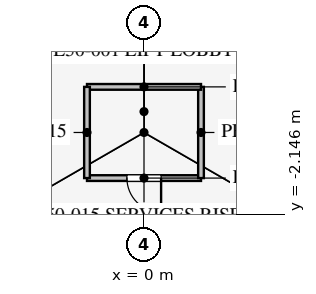
"""IFC4 building model, lengths in metres.
Left out: names, types, materials, properties, quantities, classifications, styles, units other than length and angle.
Written with IfcOpenShell. Run it as: python <this file> out.ifc"""

import sys

from ifc_helpers import new_model, si_unit, direction, frame, frame_2d, origin, place, context, subcontext, project, spatial, rectangle, extrude, element, fill, save


model = new_model("IFC4")
c1 = context("Model", 3, precision=1e-05, world=origin(), true_north=direction((0.0, 1.0)))
c2 = subcontext(c1, "Body", "Model", "MODEL_VIEW")
j1 = project(units=[si_unit("LENGTHUNIT", "METRE"), si_unit("PLANEANGLEUNIT", "RADIAN")], contexts=[c1])
p1 = place(None, origin())
s1 = spatial("IfcSite", under=j1, at=p1, CompositionType="ELEMENT")
p2 = place(p1, origin())
s2 = spatial("IfcBuilding", under=s1, at=p2, CompositionType="ELEMENT")
p3 = place(p2, frame((0.0, 0.0, 219.1)))
s3 = spatial("IfcBuildingStorey", under=s2, at=p3, CompositionType="ELEMENT", Elevation=219.1)
p4 = place(p3, frame((-1.5, -1.2, 0.0), z_axis=(0.0, 0.0, 1.0), x_axis=(1.0, 0.0, 0.0)))
e1 = element("IfcWall", 1, at=p4, inside=s3, PredefinedType="PARTITIONING", context=c2, shape_type="SweptSolid", body=[
    extrude(rectangle(XDim=3.0, YDim=0.15, at=frame_2d((1.5, 0.0))), origin(), (0.0, 0.0, 1.0), 4.0),
])
p5 = place(p4, frame((1.05, 0.0, 0.0)))
e2 = element("IfcOpeningElement", 2, at=p5, cuts=e1, PredefinedType="OPENING", context=c2, shape_type="SweptSolid", body=[
    extrude(rectangle(XDim=0.9, YDim=2.1, at=frame_2d((0.45, 1.05))), frame((0.0, 0.085, 0.0), z_axis=(0.0, -1.0, 0.0), x_axis=(1.0, 0.0, 0.0)), (0.0, 0.0, 1.0), 0.17),
])
p6 = place(p3, frame((1.5, -1.2, 0.0), z_axis=(0.0, 0.0, 1.0), x_axis=(0.0, 1.0, 0.0)))
e3 = element("IfcWall", 3, at=p6, inside=s3, PredefinedType="PARTITIONING", context=c2, shape_type="SweptSolid", body=[
    extrude(rectangle(XDim=2.4, YDim=0.15, at=frame_2d((1.2, 0.0))), origin(), (0.0, 0.0, 1.0), 4.0),
])
p7 = place(p3, frame((1.5, 1.2, 0.0), z_axis=(0.0, 0.0, 1.0), x_axis=(-1.0, 0.0, 0.0)))
e4 = element("IfcWall", 4, at=p7, inside=s3, PredefinedType="PARTITIONING", context=c2, shape_type="SweptSolid", body=[
    extrude(rectangle(XDim=3.0, YDim=0.15, at=frame_2d((1.5, 0.0))), origin(), (0.0, 0.0, 1.0), 4.0),
])
p8 = place(p3, frame((-1.5, 1.2, 0.0), z_axis=(0.0, 0.0, 1.0), x_axis=(0.0, -1.0, 0.0)))
e5 = element("IfcWall", 5, at=p8, inside=s3, PredefinedType="PARTITIONING", context=c2, shape_type="SweptSolid", body=[
    extrude(rectangle(XDim=2.4, YDim=0.15, at=frame_2d((1.2, 0.0))), origin(), (0.0, 0.0, 1.0), 4.0),
])
p9 = place(p3, frame((-0.016, 30.491, 0.0), z_axis=(0.0, 0.0, 1.0), x_axis=(-0.50000091641, -0.866024874695, 0.0)))
e6 = element("IfcWall", 6, at=p9, inside=s3, PredefinedType="PARTITIONING", context=c2, shape_type="SweptSolid", body=[
    extrude(rectangle(XDim=52.796, YDim=0.12, at=frame_2d((26.398, 0.0))), origin(), (0.0, 0.0, 1.0), 2.9),
])
p10 = place(p9, frame((10.2, 0.0, 0.15)))
e7 = element("IfcOpeningElement", 7, at=p10, cuts=e6, PredefinedType="OPENING", context=c2, shape_type="SweptSolid", body=[
    extrude(rectangle(XDim=1.8, YDim=2.1, at=frame_2d((0.9, 1.05))), frame((0.0, 0.07, 0.0), z_axis=(0.0, -1.0, 0.0), x_axis=(1.0, 0.0, 0.0)), (0.0, 0.0, 1.0), 0.14),
])
p11 = place(p9, frame((40.8, 0.0, 0.15)))
e8 = element("IfcOpeningElement", 8, at=p11, cuts=e6, PredefinedType="OPENING", context=c2, shape_type="SweptSolid", body=[
    extrude(rectangle(XDim=1.8, YDim=2.1, at=frame_2d((0.9, 1.05))), frame((0.0, 0.07, 0.0), z_axis=(0.0, -1.0, 0.0), x_axis=(1.0, 0.0, 0.0)), (0.0, 0.0, 1.0), 0.14),
])
p12 = place(p5, frame((0.9, 0.0, 0.0), z_axis=(0.0, 0.0, 1.0), x_axis=(-1.0, 0.0, 0.0)))
e9 = element("IfcDoor", 9, at=p12, inside=s3, OperationType="SINGLE_SWING_LEFT", PredefinedType="DOOR", context=c2, shape_type="SweptSolid", body=[
    extrude(rectangle(XDim=0.9, YDim=2.1, at=frame_2d((0.45, 1.05))), frame((0.0, 0.025, 0.0), z_axis=(0.0, -1.0, 0.0), x_axis=(1.0, 0.0, 0.0)), (0.0, 0.0, 1.0), 0.05),
])
fill(e2, e9)
save(model, sys.argv[1])
